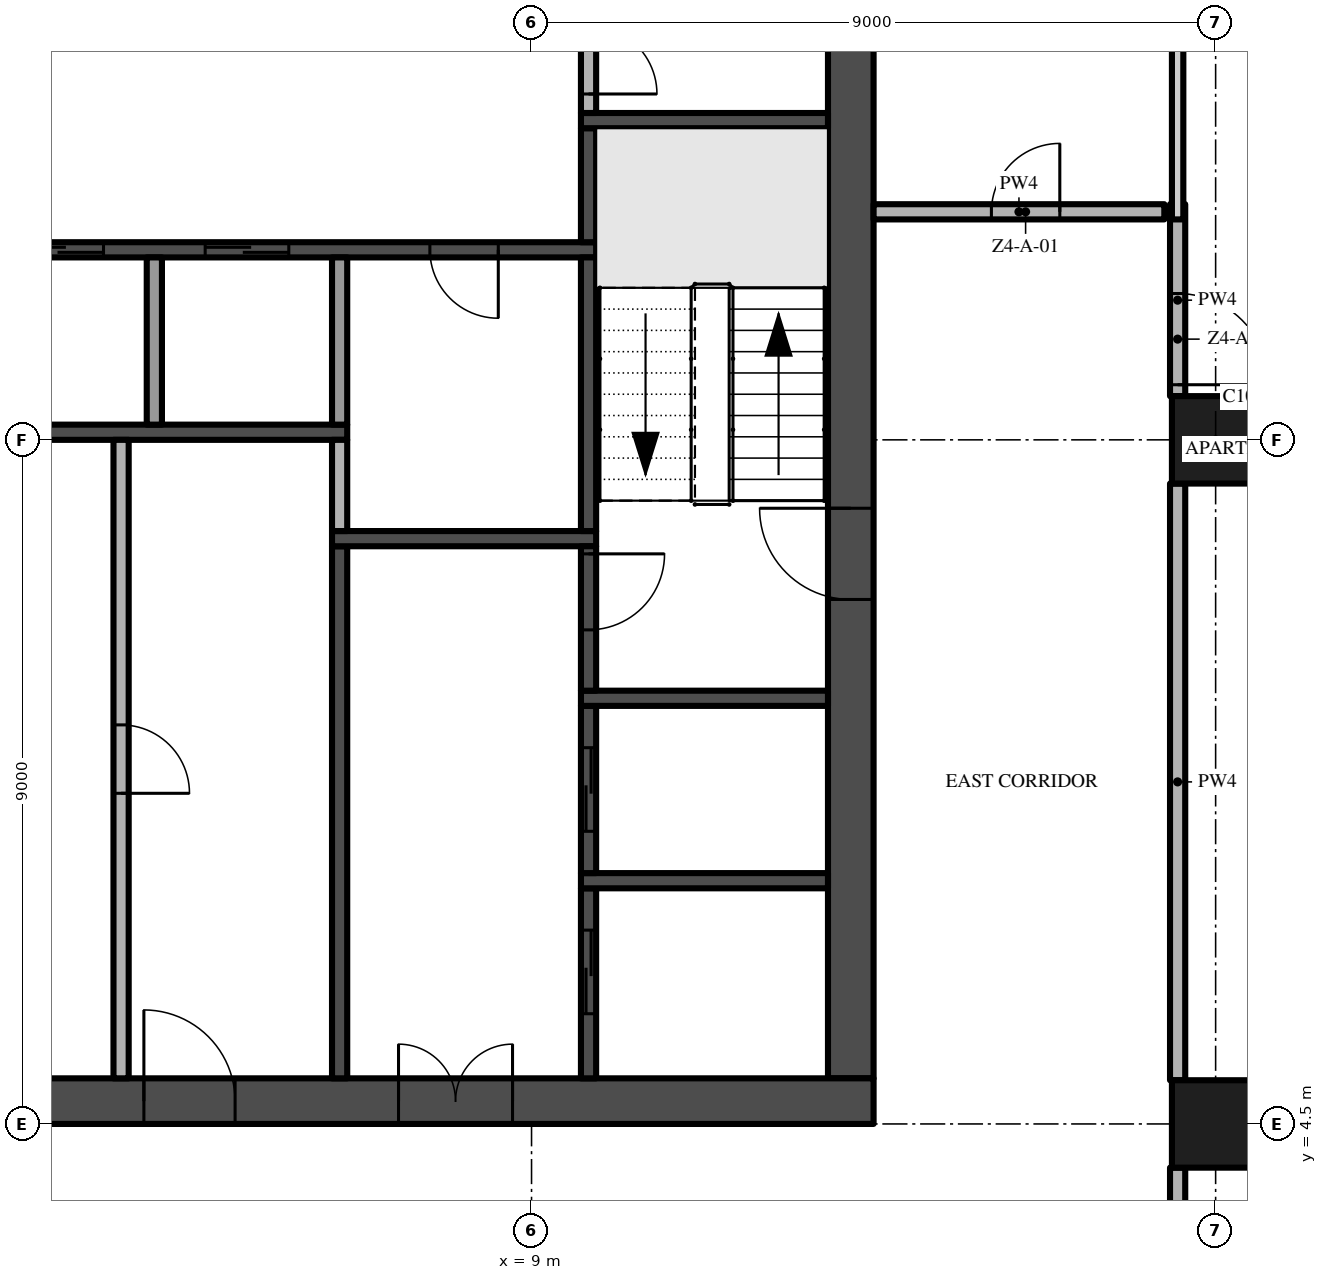
"""IFC4 building model, lengths in metres.
Left out: names, types, materials, properties, quantities, classifications, styles, units other than length and angle.
Written with IfcOpenShell. Run it as: python <this file> out.ifc"""

import sys

from ifc_helpers import new_model, si_unit, direction, frame, frame_2d, origin, origin_2d, place, context, subcontext, project, spatial, rectangle, extrude, element, fill, save


model = new_model("IFC4")
c1 = context("Model", 3, precision=1e-05, world=origin(), true_north=direction((0.0, 1.0)))
c2 = subcontext(c1, "Body", "Model", "MODEL_VIEW")
j1 = project(units=[si_unit("LENGTHUNIT", "METRE"), si_unit("PLANEANGLEUNIT", "RADIAN")], contexts=[c1])
p1 = place(None, origin())
s1 = spatial("IfcSite", under=j1, at=p1, CompositionType="ELEMENT")
p2 = place(p1, origin())
s2 = spatial("IfcBuilding", under=s1, at=p2, CompositionType="ELEMENT")
p3 = place(p2, frame((0.0, 0.0, 184.4)))
s3 = spatial("IfcBuildingStorey", under=s2, at=p3, CompositionType="ELEMENT", Elevation=184.4)
p4 = place(p3, frame((-13.5, 4.8, -0.3), z_axis=(0.0, 0.0, 1.0), x_axis=(1.0, 0.0, 0.0)))
e1 = element("IfcWall", 1, at=p4, inside=s3, PredefinedType="SHEAR", context=c2, shape_type="SweptSolid", body=[
    extrude(rectangle(XDim=27.0, YDim=0.6, at=frame_2d((13.5, 0.0))), origin(), (0.0, 0.0, 1.0), 3.8),
])
p5 = place(p4, frame((12.0, 0.0, 0.3)))
e2 = element("IfcOpeningElement", 2, at=p5, cuts=e1, PredefinedType="OPENING", context=c2, shape_type="SweptSolid", body=[
    extrude(rectangle(XDim=3.0, YDim=2.4, at=frame_2d((1.5, 1.2))), frame((0.0, 0.31, 0.0), z_axis=(0.0, -1.0, 0.0), x_axis=(1.0, 0.0, 0.0)), (0.0, 0.0, 1.0), 0.62),
])
p6 = place(p4, frame((4.9, 0.0, 0.3)))
e3 = element("IfcOpeningElement", 3, at=p6, cuts=e1, PredefinedType="OPENING", context=c2, shape_type="SweptSolid", body=[
    extrude(rectangle(XDim=1.2, YDim=2.2, at=frame_2d((0.6, 1.1))), frame((0.0, 0.31, 0.0), z_axis=(0.0, -1.0, 0.0), x_axis=(1.0, 0.0, 0.0)), (0.0, 0.0, 1.0), 0.62),
])
p7 = place(p4, frame((20.75, 0.0, 0.3)))
e4 = element("IfcOpeningElement", 4, at=p7, cuts=e1, PredefinedType="OPENING", context=c2, shape_type="SweptSolid", body=[
    extrude(rectangle(XDim=1.5, YDim=2.2, at=frame_2d((0.75, 1.1))), frame((0.0, 0.31, 0.0), z_axis=(0.0, -1.0, 0.0), x_axis=(1.0, 0.0, 0.0)), (0.0, 0.0, 1.0), 0.62),
])
p8 = place(p4, frame((17.4, 0.0, 0.3)))
e5 = element("IfcOpeningElement", 5, at=p8, cuts=e1, PredefinedType="OPENING", context=c2, shape_type="SweptSolid", body=[
    extrude(rectangle(XDim=1.2, YDim=2.2, at=frame_2d((0.6, 1.1))), frame((0.0, 0.31, 0.0), z_axis=(0.0, -1.0, 0.0), x_axis=(1.0, 0.0, 0.0)), (0.0, 0.0, 1.0), 0.62),
])
p9 = place(p3, frame((13.2, 5.1, -0.3), z_axis=(0.0, 0.0, 1.0), x_axis=(0.0, 1.0, 0.0)))
e6 = element("IfcWall", 6, at=p9, inside=s3, PredefinedType="SHEAR", context=c2, shape_type="SweptSolid", body=[
    extrude(rectangle(XDim=16.8, YDim=0.6, at=frame_2d((8.4, 0.0))), origin(), (0.0, 0.0, 1.0), 3.8),
])
p10 = place(p9, frame((6.3, 0.0, 0.3)))
e7 = element("IfcOpeningElement", 7, at=p10, cuts=e6, PredefinedType="OPENING", context=c2, shape_type="SweptSolid", body=[
    extrude(rectangle(XDim=1.2, YDim=2.2, at=frame_2d((0.6, 1.1))), frame((0.0, 0.31, 0.0), z_axis=(0.0, -1.0, 0.0), x_axis=(1.0, 0.0, 0.0)), (0.0, 0.0, 1.0), 0.62),
])
for number, where, z_axis, x_axis in (
    (8, (18.0, 13.5, 0.0), (0.0, 0.0, 1.0), (1.0, 0.0, 0.0)),
    (9, (18.0, 4.5, 0.0), (0.0, 0.0, 1.0), (1.0, 0.0, 0.0)),
):
    element("IfcColumn", number, at=place(p3, frame(where, z_axis=z_axis, x_axis=x_axis)), inside=s3, PredefinedType="COLUMN", context=c2, shape_type="SweptSolid", body=[
        extrude(rectangle(XDim=1.15, YDim=1.15, at=origin_2d()), origin(), (0.0, 0.0, 1.0), 3.5),
    ])
p11 = place(p3, frame((1.5, 13.6, 0.0), z_axis=(0.0, 0.0, 1.0), x_axis=(1.0, 0.0, 0.0)))
e10 = element("IfcWall", 10, at=p11, inside=s3, PredefinedType="SHEAR", context=c2, shape_type="SweptSolid", body=[
    extrude(rectangle(XDim=5.075, YDim=0.2, at=frame_2d((2.538, 0.0))), origin(), (0.0, 0.0, 1.0), 3.5),
])
p12 = place(p3, frame((9.85, 16.0, 0.0), z_axis=(0.0, 0.0, 1.0), x_axis=(-1.0, 0.0, 0.0)))
e11 = element("IfcWall", 11, at=p12, inside=s3, PredefinedType="SHEAR", context=c2, shape_type="SweptSolid", body=[
    extrude(rectangle(XDim=8.35, YDim=0.2, at=frame_2d((4.175, 0.0))), origin(), (0.0, 0.0, 1.0), 3.5),
])
p13 = place(p12, frame((6.481, 0.0, 0.0)))
e12 = element("IfcOpeningElement", 12, at=p13, cuts=e11, PredefinedType="OPENING", context=c2, shape_type="SweptSolid", body=[
    extrude(rectangle(XDim=1.1, YDim=2.1, at=frame_2d((0.55, 1.05))), frame((0.0, 0.11, 0.0), z_axis=(0.0, -1.0, 0.0), x_axis=(1.0, 0.0, 0.0)), (0.0, 0.0, 1.0), 0.22),
])
p14 = place(p12, frame((4.044, 0.0, 0.0)))
e13 = element("IfcOpeningElement", 13, at=p14, cuts=e11, PredefinedType="OPENING", context=c2, shape_type="SweptSolid", body=[
    extrude(rectangle(XDim=1.1, YDim=2.1, at=frame_2d((0.55, 1.05))), frame((0.0, 0.11, 0.0), z_axis=(0.0, -1.0, 0.0), x_axis=(1.0, 0.0, 0.0)), (0.0, 0.0, 1.0), 0.22),
])
p15 = place(p12, frame((1.288, 0.0, 0.0)))
e14 = element("IfcOpeningElement", 14, at=p15, cuts=e11, PredefinedType="OPENING", context=c2, shape_type="SweptSolid", body=[
    extrude(rectangle(XDim=0.9, YDim=2.1, at=frame_2d((0.45, 1.05))), frame((0.0, 0.11, 0.0), z_axis=(0.0, -1.0, 0.0), x_axis=(1.0, 0.0, 0.0)), (0.0, 0.0, 1.0), 0.22),
])
p16 = place(p3, frame((3.6, 13.5, 0.0), z_axis=(0.0, 0.0, 1.0), x_axis=(0.0, -1.0, 0.0)))
e15 = element("IfcWall", 15, at=p16, inside=s3, PredefinedType="PARTITIONING", context=c2, shape_type="SweptSolid", body=[
    extrude(rectangle(XDim=8.4, YDim=0.2, at=frame_2d((4.2, 0.0))), origin(), (0.0, 0.0, 1.0), 3.5),
])
p17 = place(p16, frame((3.75, 0.0, 0.0)))
e16 = element("IfcOpeningElement", 16, at=p17, cuts=e15, PredefinedType="OPENING", context=c2, shape_type="SweptSolid", body=[
    extrude(rectangle(XDim=0.9, YDim=2.1, at=frame_2d((0.45, 1.05))), frame((0.0, 0.11, 0.0), z_axis=(0.0, -1.0, 0.0), x_axis=(1.0, 0.0, 0.0)), (0.0, 0.0, 1.0), 0.22),
])
p18 = place(p3, frame((4.037, 13.7, 0.0), z_axis=(0.0, 0.0, 1.0), x_axis=(0.0, 1.0, 0.0)))
e17 = element("IfcWall", 17, at=p18, inside=s3, PredefinedType="PARTITIONING", context=c2, shape_type="SweptSolid", body=[
    extrude(rectangle(XDim=2.2, YDim=0.2, at=frame_2d((1.1, 0.0))), origin(), (0.0, 0.0, 1.0), 3.5),
])
p19 = place(p3, frame((6.475, 5.1, 0.0), z_axis=(0.0, 0.0, 1.0), x_axis=(0.0, 1.0, 0.0)))
e18 = element("IfcWall", 18, at=p19, inside=s3, PredefinedType="SHEAR", context=c2, shape_type="SweptSolid", body=[
    extrude(rectangle(XDim=7.0, YDim=0.2, at=frame_2d((3.5, 0.0))), origin(), (0.0, 0.0, 1.0), 3.5),
])
p20 = place(p3, frame((6.375, 12.2, 0.0), z_axis=(0.0, 0.0, 1.0), x_axis=(1.0, 0.0, 0.0)))
e19 = element("IfcWall", 19, at=p20, inside=s3, PredefinedType="SHEAR", context=c2, shape_type="SweptSolid", body=[
    extrude(rectangle(XDim=3.475, YDim=0.2, at=frame_2d((1.738, 0.0))), origin(), (0.0, 0.0, 1.0), 3.5),
])
p21 = place(p3, frame((6.475, 12.3, 0.0), z_axis=(0.0, 0.0, 1.0), x_axis=(0.0, 1.0, 0.0)))
e20 = element("IfcWall", 20, at=p21, inside=s3, PredefinedType="PARTITIONING", context=c2, shape_type="SweptSolid", body=[
    extrude(rectangle(XDim=1.2, YDim=0.2, at=frame_2d((0.6, 0.0))), origin(), (0.0, 0.0, 1.0), 3.5),
])
p22 = place(p3, frame((6.475, 13.7, 0.0), z_axis=(0.0, 0.0, 1.0), x_axis=(0.0, 1.0, 0.0)))
e21 = element("IfcWall", 21, at=p22, inside=s3, PredefinedType="PARTITIONING", context=c2, shape_type="SweptSolid", body=[
    extrude(rectangle(XDim=2.2, YDim=0.2, at=frame_2d((1.1, 0.0))), origin(), (0.0, 0.0, 1.0), 3.5),
])
p23 = place(p3, frame((9.75, 5.1, 0.0), z_axis=(0.0, 0.0, 1.0), x_axis=(0.0, 1.0, 0.0)))
e22 = element("IfcWall", 22, at=p23, inside=s3, PredefinedType="SHEAR", context=c2, shape_type="SweptSolid", body=[
    extrude(rectangle(XDim=2.5, YDim=0.2, at=frame_2d((1.25, 0.0))), origin(), (0.0, 0.0, 1.0), 3.5),
])
p24 = place(p23, frame((0.85, 0.0, 0.0)))
e23 = element("IfcOpeningElement", 23, at=p24, cuts=e22, PredefinedType="OPENING", context=c2, shape_type="SweptSolid", body=[
    extrude(rectangle(XDim=1.1, YDim=2.1, at=frame_2d((0.55, 1.05))), frame((0.0, 0.11, 0.0), z_axis=(0.0, -1.0, 0.0), x_axis=(1.0, 0.0, 0.0)), (0.0, 0.0, 1.0), 0.22),
])
p25 = place(p3, frame((9.65, 7.7, 0.0), z_axis=(0.0, 0.0, 1.0), x_axis=(1.0, 0.0, 0.0)))
e24 = element("IfcWall", 24, at=p25, inside=s3, PredefinedType="SHEAR", context=c2, shape_type="SweptSolid", body=[
    extrude(rectangle(XDim=3.25, YDim=0.2, at=frame_2d((1.625, 0.0))), origin(), (0.0, 0.0, 1.0), 3.5),
])
p26 = place(p3, frame((9.75, 7.8, 0.0), z_axis=(0.0, 0.0, 1.0), x_axis=(0.0, 1.0, 0.0)))
e25 = element("IfcWall", 25, at=p26, inside=s3, PredefinedType="SHEAR", context=c2, shape_type="SweptSolid", body=[
    extrude(rectangle(XDim=2.2, YDim=0.2, at=frame_2d((1.1, 0.0))), origin(), (0.0, 0.0, 1.0), 3.5),
])
p27 = place(p26, frame((0.55, 0.0, 0.0)))
e26 = element("IfcOpeningElement", 26, at=p27, cuts=e25, PredefinedType="OPENING", context=c2, shape_type="SweptSolid", body=[
    extrude(rectangle(XDim=1.1, YDim=2.1, at=frame_2d((0.55, 1.05))), frame((0.0, 0.11, 0.0), z_axis=(0.0, -1.0, 0.0), x_axis=(1.0, 0.0, 0.0)), (0.0, 0.0, 1.0), 0.22),
])
p28 = place(p3, frame((9.65, 10.1, 0.0), z_axis=(0.0, 0.0, 1.0), x_axis=(1.0, 0.0, 0.0)))
e27 = element("IfcWall", 27, at=p28, inside=s3, PredefinedType="SHEAR", context=c2, shape_type="SweptSolid", body=[
    extrude(rectangle(XDim=3.25, YDim=0.2, at=frame_2d((1.625, 0.0))), origin(), (0.0, 0.0, 1.0), 3.5),
])
p29 = place(p3, frame((9.75, 12.1, 0.0), z_axis=(0.0, 0.0, 1.0), x_axis=(0.0, -1.0, 0.0)))
e28 = element("IfcWall", 28, at=p29, inside=s3, PredefinedType="SHEAR", context=c2, shape_type="SweptSolid", body=[
    extrude(rectangle(XDim=1.9, YDim=0.2, at=frame_2d((0.95, 0.0))), origin(), (0.0, 0.0, 1.0), 3.5),
])
p30 = place(p29, frame((0.1, 0.0, 0.0)))
e29 = element("IfcOpeningElement", 29, at=p30, cuts=e28, PredefinedType="OPENING", context=c2, shape_type="SweptSolid", body=[
    extrude(rectangle(XDim=1.0, YDim=2.2, at=frame_2d((0.5, 1.1))), frame((0.0, 0.11, 0.0), z_axis=(0.0, -1.0, 0.0), x_axis=(1.0, 0.0, 0.0)), (0.0, 0.0, 1.0), 0.22),
])
p31 = place(p3, frame((9.75, 12.3, 0.0), z_axis=(0.0, 0.0, 1.0), x_axis=(0.0, 1.0, 0.0)))
e30 = element("IfcWall", 30, at=p31, inside=s3, PredefinedType="SHEAR", context=c2, shape_type="SweptSolid", body=[
    extrude(rectangle(XDim=3.6, YDim=0.2, at=frame_2d((1.8, 0.0))), origin(), (0.0, 0.0, 1.0), 3.5),
])
p32 = place(p3, frame((9.75, 16.1, 0.0), z_axis=(0.0, 0.0, 1.0), x_axis=(0.0, 1.0, 0.0)))
e31 = element("IfcWall", 31, at=p32, inside=s3, PredefinedType="SHEAR", context=c2, shape_type="SweptSolid", body=[
    extrude(rectangle(XDim=1.5, YDim=0.2, at=frame_2d((0.75, 0.0))), origin(), (0.0, 0.0, 1.0), 3.5),
])
p33 = place(p3, frame((9.65, 17.7, 0.0), z_axis=(0.0, 0.0, 1.0), x_axis=(1.0, 0.0, 0.0)))
e32 = element("IfcWall", 32, at=p33, inside=s3, PredefinedType="SHEAR", context=c2, shape_type="SweptSolid", body=[
    extrude(rectangle(XDim=3.25, YDim=0.2, at=frame_2d((1.625, 0.0))), origin(), (0.0, 0.0, 1.0), 3.5),
])
p34 = place(p3, frame((9.75, 19.2, 0.0), z_axis=(0.0, 0.0, 1.0), x_axis=(0.0, -1.0, 0.0)))
e33 = element("IfcWall", 33, at=p34, inside=s3, PredefinedType="PARTITIONING", context=c2, shape_type="SweptSolid", body=[
    extrude(rectangle(XDim=1.4, YDim=0.2, at=frame_2d((0.7, 0.0))), origin(), (0.0, 0.0, 1.0), 3.5),
])
p35 = place(p34, frame((0.25, 0.0, 0.0)))
e34 = element("IfcOpeningElement", 34, at=p35, cuts=e33, PredefinedType="OPENING", context=c2, shape_type="SweptSolid", body=[
    extrude(rectangle(XDim=0.9, YDim=2.1, at=frame_2d((0.45, 1.05))), frame((0.0, 0.11, 0.0), z_axis=(0.0, -1.0, 0.0), x_axis=(1.0, 0.0, 0.0)), (0.0, 0.0, 1.0), 0.22),
])
p36 = place(p3, frame((13.5, 16.5, 0.0), z_axis=(0.0, 0.0, 1.0), x_axis=(1.0, 0.0, 0.0)))
e35 = element("IfcWall", 35, at=p36, inside=s3, PredefinedType="PARTITIONING", context=c2, shape_type="SweptSolid", body=[
    extrude(rectangle(XDim=3.825, YDim=0.2, at=frame_2d((1.913, 0.0))), origin(), (0.0, 0.0, 1.0), 3.5),
])
p37 = place(p36, frame((1.55, 0.0, 0.0)))
e36 = element("IfcOpeningElement", 36, at=p37, cuts=e35, PredefinedType="OPENING", context=c2, shape_type="SweptSolid", body=[
    extrude(rectangle(XDim=0.9, YDim=2.1, at=frame_2d((0.45, 1.05))), frame((0.0, 0.11, 0.0), z_axis=(0.0, -1.0, 0.0), x_axis=(1.0, 0.0, 0.0)), (0.0, 0.0, 1.0), 0.22),
])
p38 = place(p3, frame((17.5, -0.2, 0.0), z_axis=(0.0, 0.0, 1.0), x_axis=(0.0, 1.0, 0.0)))
e37 = element("IfcWall", 37, at=p38, inside=s3, PredefinedType="PARTITIONING", context=c2, shape_type="SweptSolid", body=[
    extrude(rectangle(XDim=4.125, YDim=0.2, at=frame_2d((2.062, 0.0))), origin(), (0.0, 0.0, 1.0), 3.5),
])
p39 = place(p3, frame((17.5, 5.075, 0.0), z_axis=(0.0, 0.0, 1.0), x_axis=(0.0, 1.0, 0.0)))
e38 = element("IfcWall", 38, at=p39, inside=s3, PredefinedType="PARTITIONING", context=c2, shape_type="SweptSolid", body=[
    extrude(rectangle(XDim=7.85, YDim=0.2, at=frame_2d((3.925, 0.0))), origin(), (0.0, 0.0, 1.0), 3.5),
])
p40 = place(p3, frame((17.5, 16.6, 0.0), z_axis=(0.0, 0.0, 1.0), x_axis=(0.0, -1.0, 0.0)))
e39 = element("IfcWall", 39, at=p40, inside=s3, PredefinedType="PARTITIONING", context=c2, shape_type="SweptSolid", body=[
    extrude(rectangle(XDim=2.525, YDim=0.2, at=frame_2d((1.262, 0.0))), origin(), (0.0, 0.0, 1.0), 3.5),
])
p41 = place(p40, frame((1.175, 0.0, 0.0)))
e40 = element("IfcOpeningElement", 40, at=p41, cuts=e39, PredefinedType="OPENING", context=c2, shape_type="SweptSolid", body=[
    extrude(rectangle(XDim=1.2, YDim=2.4, at=frame_2d((0.6, 1.2))), frame((0.0, 0.11, 0.0), z_axis=(0.0, -1.0, 0.0), x_axis=(1.0, 0.0, 0.0)), (0.0, 0.0, 1.0), 0.22),
])
p42 = place(p3, frame((17.5, 16.4, 0.0), z_axis=(0.0, 0.0, 1.0), x_axis=(0.0, 1.0, 0.0)))
e41 = element("IfcWall", 41, at=p42, inside=s3, PredefinedType="PARTITIONING", context=c2, shape_type="SweptSolid", body=[
    extrude(rectangle(XDim=5.05, YDim=0.15, at=frame_2d((2.525, 0.0))), origin(), (0.0, 0.0, 1.0), 3.5),
])
p43 = place(p10, frame((1.2, 0.0, 0.0), z_axis=(0.0, 0.0, 1.0), x_axis=(-1.0, 0.0, 0.0)))
e42 = element("IfcDoor", 42, at=p43, inside=s3, OperationType="SINGLE_SWING_LEFT", PredefinedType="DOOR", context=c2, shape_type="SweptSolid", body=[
    extrude(rectangle(XDim=1.2, YDim=2.2, at=frame_2d((0.6, 1.1))), frame((0.0, 0.025, 0.0), z_axis=(0.0, -1.0, 0.0), x_axis=(1.0, 0.0, 0.0)), (0.0, 0.0, 1.0), 0.05),
])
fill(e7, e42)
p44 = place(p7, frame((1.5, 0.0, 0.0), z_axis=(0.0, 0.0, 1.0), x_axis=(-1.0, 0.0, 0.0)))
e43 = element("IfcDoor", 43, at=p44, inside=s3, OperationType="DOUBLE_DOOR_SINGLE_SWING", PredefinedType="DOOR", context=c2, shape_type="SweptSolid", body=[
    extrude(rectangle(XDim=1.5, YDim=2.2, at=frame_2d((0.75, 1.1))), frame((0.0, 0.025, 0.0), z_axis=(0.0, -1.0, 0.0), x_axis=(1.0, 0.0, 0.0)), (0.0, 0.0, 1.0), 0.05),
])
fill(e4, e43)
p45 = place(p8, frame((1.2, 0.0, 0.0), z_axis=(0.0, 0.0, 1.0), x_axis=(-1.0, 0.0, 0.0)))
e44 = element("IfcDoor", 44, at=p45, inside=s3, OperationType="SINGLE_SWING_RIGHT", PredefinedType="DOOR", context=c2, shape_type="SweptSolid", body=[
    extrude(rectangle(XDim=1.2, YDim=2.2, at=frame_2d((0.6, 1.1))), frame((0.0, 0.025, 0.0), z_axis=(0.0, -1.0, 0.0), x_axis=(1.0, 0.0, 0.0)), (0.0, 0.0, 1.0), 0.05),
])
fill(e5, e44)
p46 = place(p30, origin())
e45 = element("IfcDoor", 45, at=p46, inside=s3, OperationType="SINGLE_SWING_LEFT", PredefinedType="DOOR", context=c2, shape_type="SweptSolid", body=[
    extrude(rectangle(XDim=1.0, YDim=2.2, at=frame_2d((0.5, 1.1))), frame((0.0, 0.025, 0.0), z_axis=(0.0, -1.0, 0.0), x_axis=(1.0, 0.0, 0.0)), (0.0, 0.0, 1.0), 0.05),
])
fill(e29, e45)
p47 = place(p13, origin())
e46 = element("IfcDoor", 46, at=p47, inside=s3, OperationType="SLIDING_TO_RIGHT", PredefinedType="DOOR", context=c2, shape_type="SweptSolid", body=[
    extrude(rectangle(XDim=1.1, YDim=2.1, at=frame_2d((0.55, 1.05))), frame((0.0, 0.025, 0.0), z_axis=(0.0, -1.0, 0.0), x_axis=(1.0, 0.0, 0.0)), (0.0, 0.0, 1.0), 0.05),
])
fill(e12, e46)
p48 = place(p14, origin())
e47 = element("IfcDoor", 47, at=p48, inside=s3, OperationType="SLIDING_TO_RIGHT", PredefinedType="DOOR", context=c2, shape_type="SweptSolid", body=[
    extrude(rectangle(XDim=1.1, YDim=2.1, at=frame_2d((0.55, 1.05))), frame((0.0, 0.025, 0.0), z_axis=(0.0, -1.0, 0.0), x_axis=(1.0, 0.0, 0.0)), (0.0, 0.0, 1.0), 0.05),
])
fill(e13, e47)
p49 = place(p24, origin())
e48 = element("IfcDoor", 48, at=p49, inside=s3, OperationType="SLIDING_TO_RIGHT", PredefinedType="DOOR", context=c2, shape_type="SweptSolid", body=[
    extrude(rectangle(XDim=1.1, YDim=2.1, at=frame_2d((0.55, 1.05))), frame((0.0, 0.025, 0.0), z_axis=(0.0, -1.0, 0.0), x_axis=(1.0, 0.0, 0.0)), (0.0, 0.0, 1.0), 0.05),
])
fill(e23, e48)
p50 = place(p27, origin())
e49 = element("IfcDoor", 49, at=p50, inside=s3, OperationType="SLIDING_TO_RIGHT", PredefinedType="DOOR", context=c2, shape_type="SweptSolid", body=[
    extrude(rectangle(XDim=1.1, YDim=2.1, at=frame_2d((0.55, 1.05))), frame((0.0, 0.025, 0.0), z_axis=(0.0, -1.0, 0.0), x_axis=(1.0, 0.0, 0.0)), (0.0, 0.0, 1.0), 0.05),
])
fill(e26, e49)
p51 = place(p15, origin())
e50 = element("IfcDoor", 50, at=p51, inside=s3, OperationType="SINGLE_SWING_LEFT", PredefinedType="DOOR", context=c2, shape_type="SweptSolid", body=[
    extrude(rectangle(XDim=0.9, YDim=2.1, at=frame_2d((0.45, 1.05))), frame((0.0, 0.025, 0.0), z_axis=(0.0, -1.0, 0.0), x_axis=(1.0, 0.0, 0.0)), (0.0, 0.0, 1.0), 0.05),
])
fill(e14, e50)
p52 = place(p35, origin())
e51 = element("IfcDoor", 51, at=p52, inside=s3, OperationType="SINGLE_SWING_RIGHT", PredefinedType="DOOR", context=c2, shape_type="SweptSolid", body=[
    extrude(rectangle(XDim=0.9, YDim=2.1, at=frame_2d((0.45, 1.05))), frame((0.0, 0.025, 0.0), z_axis=(0.0, -1.0, 0.0), x_axis=(1.0, 0.0, 0.0)), (0.0, 0.0, 1.0), 0.05),
])
fill(e34, e51)
p53 = place(p17, origin())
e52 = element("IfcDoor", 52, at=p53, inside=s3, OperationType="SINGLE_SWING_RIGHT", PredefinedType="DOOR", context=c2, shape_type="SweptSolid", body=[
    extrude(rectangle(XDim=0.9, YDim=2.1, at=frame_2d((0.45, 1.05))), frame((0.0, 0.025, 0.0), z_axis=(0.0, -1.0, 0.0), x_axis=(1.0, 0.0, 0.0)), (0.0, 0.0, 1.0), 0.05),
])
fill(e16, e52)
p54 = place(p37, origin())
e53 = element("IfcDoor", 53, at=p54, inside=s3, OperationType="SINGLE_SWING_RIGHT", PredefinedType="DOOR", context=c2, shape_type="SweptSolid", body=[
    extrude(rectangle(XDim=0.9, YDim=2.1, at=frame_2d((0.45, 1.05))), frame((0.0, 0.025, 0.0), z_axis=(0.0, -1.0, 0.0), x_axis=(1.0, 0.0, 0.0)), (0.0, 0.0, 1.0), 0.05),
])
fill(e36, e53)
p55 = place(p41, origin())
e54 = element("IfcDoor", 54, at=p55, inside=s3, OperationType="SINGLE_SWING_RIGHT", PredefinedType="DOOR", context=c2, shape_type="SweptSolid", body=[
    extrude(rectangle(XDim=1.2, YDim=2.4, at=frame_2d((0.6, 1.2))), frame((0.0, 0.025, 0.0), z_axis=(0.0, -1.0, 0.0), x_axis=(1.0, 0.0, 0.0)), (0.0, 0.0, 1.0), 0.05),
])
fill(e40, e54)
save(model, sys.argv[1])
